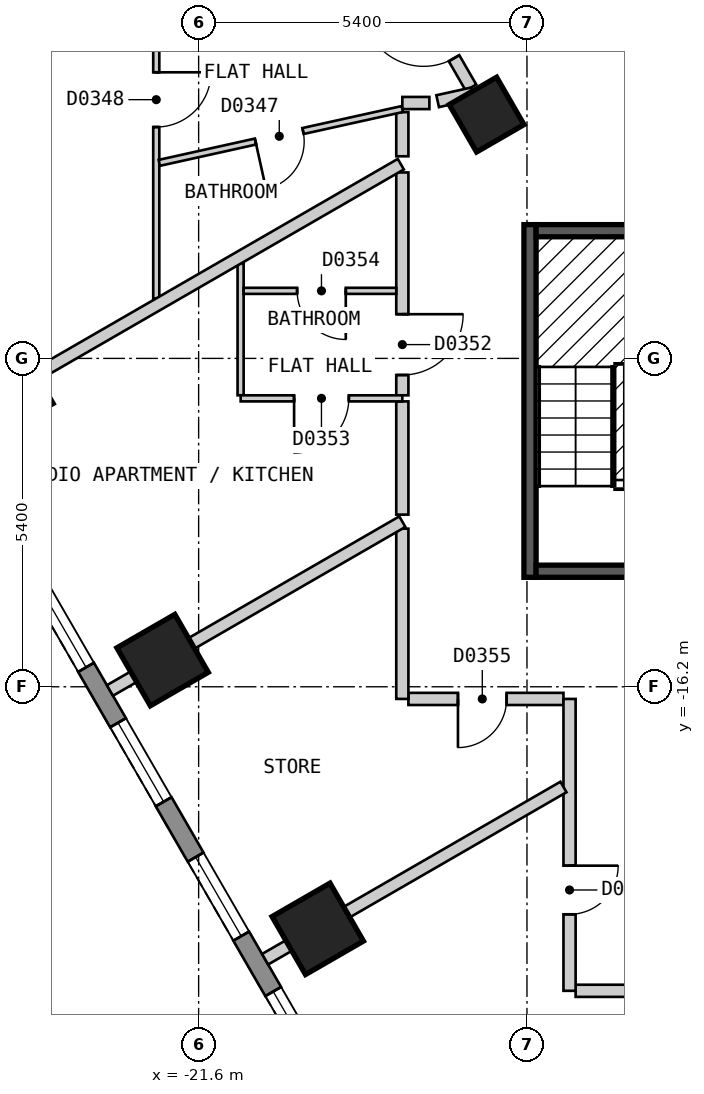
"""IFC4 building model, lengths in metres.
Left out: names, types, materials, properties, quantities, classifications, styles, units other than length and angle.
Written with IfcOpenShell. Run it as: python <this file> out.ifc"""

import sys

from ifc_helpers import new_model, si_unit, direction, frame, frame_2d, origin, origin_2d, place, context, subcontext, project, spatial, polyline, rectangle, outline, extrude, element, fill, save


model = new_model("IFC4")
c1 = context("Model", 3, precision=1e-05, world=origin(), true_north=direction((0.0, 1.0)))
c2 = subcontext(c1, "Body", "Model", "MODEL_VIEW")
j1 = project(units=[si_unit("LENGTHUNIT", "METRE"), si_unit("PLANEANGLEUNIT", "RADIAN")], contexts=[c1])
p1 = place(None, origin())
s1 = spatial("IfcSite", under=j1, at=p1, CompositionType="ELEMENT")
p2 = place(p1, origin())
s2 = spatial("IfcBuilding", under=s1, at=p2, CompositionType="ELEMENT")
p3 = place(p2, frame((0.0, 0.0, 59.4)))
s3 = spatial("IfcBuildingStorey", under=s2, at=p3, CompositionType="ELEMENT", Elevation=59.4)
for number, where, z_axis, x_axis in (
    (1, (-24.745, -11.341, 0.0), (0.0, 0.0, 1.0), (0.5, -0.866, 0.0)),
    (2, (-22.193, -15.761, 0.0), (0.0, 0.0, 1.0), (0.5, -0.866, 0.0)),
    (3, (-19.641, -20.181, 0.0), (0.0, 0.0, 1.0), (0.5, -0.866, 0.0)),
):
    element("IfcColumn", number, at=place(p3, frame(where, z_axis=z_axis, x_axis=x_axis)), inside=s3, PredefinedType="COLUMN", context=c2, shape_type="SweptSolid", body=[
        extrude(rectangle(XDim=1.1, YDim=1.1, at=origin_2d()), origin(), (0.0, 0.0, 1.0), 3.0),
    ])
p4 = place(p3, frame((-16.864, -6.791, 0.0), z_axis=(0.0, 0.0, 1.0), x_axis=(0.499984884929, -0.866034130299, 0.0)))
e4 = element("IfcColumn", 4, at=p4, inside=s3, PredefinedType="COLUMN", context=c2, shape_type="SweptSolid", body=[
    extrude(rectangle(XDim=0.9, YDim=0.9, at=origin_2d()), origin(), (0.0, 0.0, 1.0), 3.0),
])
p5 = place(p3, frame((-31.22, -2.425, 0.0), z_axis=(0.0, 0.0, 1.0), x_axis=(0.500001938803, -0.866024284413, 0.0)))
e5 = element("IfcWall", 5, at=p5, inside=s3, PredefinedType="SOLIDWALL", context=c2, shape_type="SweptSolid", body=[
    extrude(outline(polyline([(0.0, -0.15), (27.02, -0.15), (26.94, 0.15), (0.08, 0.15), (0.0, -0.15)])), origin(), (0.0, 0.0, 1.0), 2.6),
])
p6 = place(p5, frame((1.277, 0.0, 0.15)))
e6 = element("IfcOpeningElement", 6, at=p6, cuts=e5, PredefinedType="OPENING", context=c2, shape_type="SweptSolid", body=[
    extrude(rectangle(XDim=1.5, YDim=2.1, at=frame_2d((0.75, 1.05))), frame((0.0, 0.16, 0.0), z_axis=(0.0, -1.0, 0.0), x_axis=(1.0, 0.0, 0.0)), (0.0, 0.0, 1.0), 0.32),
])
p7 = place(p5, frame((3.829, 0.0, 0.15)))
e7 = element("IfcOpeningElement", 7, at=p7, cuts=e5, PredefinedType="OPENING", context=c2, shape_type="SweptSolid", body=[
    extrude(rectangle(XDim=1.5, YDim=2.1, at=frame_2d((0.75, 1.05))), frame((0.0, 0.16, 0.0), z_axis=(0.0, -1.0, 0.0), x_axis=(1.0, 0.0, 0.0)), (0.0, 0.0, 1.0), 0.32),
])
p8 = place(p5, frame((6.382, 0.0, 0.15)))
e8 = element("IfcOpeningElement", 8, at=p8, cuts=e5, PredefinedType="OPENING", context=c2, shape_type="SweptSolid", body=[
    extrude(rectangle(XDim=1.5, YDim=2.1, at=frame_2d((0.75, 1.05))), frame((0.0, 0.16, 0.0), z_axis=(0.0, -1.0, 0.0), x_axis=(1.0, 0.0, 0.0)), (0.0, 0.0, 1.0), 0.32),
])
p9 = place(p5, frame((8.933, 0.0, 0.15)))
e9 = element("IfcOpeningElement", 9, at=p9, cuts=e5, PredefinedType="OPENING", context=c2, shape_type="SweptSolid", body=[
    extrude(rectangle(XDim=1.5, YDim=2.1, at=frame_2d((0.75, 1.05))), frame((0.0, 0.16, 0.0), z_axis=(0.0, -1.0, 0.0), x_axis=(1.0, 0.0, 0.0)), (0.0, 0.0, 1.0), 0.32),
])
p10 = place(p5, frame((11.485, 0.0, 0.15)))
e10 = element("IfcOpeningElement", 10, at=p10, cuts=e5, PredefinedType="OPENING", context=c2, shape_type="SweptSolid", body=[
    extrude(rectangle(XDim=1.5, YDim=2.1, at=frame_2d((0.75, 1.05))), frame((0.0, 0.16, 0.0), z_axis=(0.0, -1.0, 0.0), x_axis=(1.0, 0.0, 0.0)), (0.0, 0.0, 1.0), 0.32),
])
p11 = place(p5, frame((14.037, 0.0, 0.15)))
e11 = element("IfcOpeningElement", 11, at=p11, cuts=e5, PredefinedType="OPENING", context=c2, shape_type="SweptSolid", body=[
    extrude(rectangle(XDim=1.5, YDim=2.1, at=frame_2d((0.75, 1.05))), frame((0.0, 0.16, 0.0), z_axis=(0.0, -1.0, 0.0), x_axis=(1.0, 0.0, 0.0)), (0.0, 0.0, 1.0), 0.32),
])
p12 = place(p5, frame((16.589, 0.0, 0.15)))
e12 = element("IfcOpeningElement", 12, at=p12, cuts=e5, PredefinedType="OPENING", context=c2, shape_type="SweptSolid", body=[
    extrude(rectangle(XDim=1.5, YDim=2.1, at=frame_2d((0.75, 1.05))), frame((0.0, 0.16, 0.0), z_axis=(0.0, -1.0, 0.0), x_axis=(1.0, 0.0, 0.0)), (0.0, 0.0, 1.0), 0.32),
])
p13 = place(p5, frame((19.141, 0.0, 0.15)))
e13 = element("IfcOpeningElement", 13, at=p13, cuts=e5, PredefinedType="OPENING", context=c2, shape_type="SweptSolid", body=[
    extrude(rectangle(XDim=1.5, YDim=2.1, at=frame_2d((0.75, 1.05))), frame((0.0, 0.16, 0.0), z_axis=(0.0, -1.0, 0.0), x_axis=(1.0, 0.0, 0.0)), (0.0, 0.0, 1.0), 0.32),
])
p14 = place(p5, frame((21.693, 0.0, 0.15)))
e14 = element("IfcOpeningElement", 14, at=p14, cuts=e5, PredefinedType="OPENING", context=c2, shape_type="SweptSolid", body=[
    extrude(rectangle(XDim=1.5, YDim=2.1, at=frame_2d((0.75, 1.05))), frame((0.0, 0.16, 0.0), z_axis=(0.0, -1.0, 0.0), x_axis=(1.0, 0.0, 0.0)), (0.0, 0.0, 1.0), 0.32),
])
p15 = place(p5, frame((24.244, 0.0, 0.15)))
e15 = element("IfcOpeningElement", 15, at=p15, cuts=e5, PredefinedType="OPENING", context=c2, shape_type="SweptSolid", body=[
    extrude(rectangle(XDim=1.5, YDim=2.1, at=frame_2d((0.75, 1.05))), frame((0.0, 0.16, 0.0), z_axis=(0.0, -1.0, 0.0), x_axis=(1.0, 0.0, 0.0)), (0.0, 0.0, 1.0), 0.32),
])
p16 = place(p3, frame((-20.727, -0.101, 0.0), z_axis=(0.0, 0.0, 1.0), x_axis=(0.500049702773, -0.865996705973, 0.0)))
e16 = element("IfcWall", 16, at=p16, inside=s3, PredefinedType="PARTITIONING", context=c2, shape_type="SweptSolid", body=[
    extrude(rectangle(XDim=7.211, YDim=0.2, at=frame_2d((3.605, 0.0))), origin(), (0.0, 0.0, 1.0), 2.6),
])
p17 = place(p16, frame((5.654, 0.0, 0.0)))
e17 = element("IfcOpeningElement", 17, at=p17, cuts=e16, PredefinedType="OPENING", context=c2, shape_type="SweptSolid", body=[
    extrude(rectangle(XDim=1.0, YDim=2.1, at=frame_2d((0.5, 1.05))), frame((0.0, 0.11, 0.0), z_axis=(0.0, -1.0, 0.0), x_axis=(1.0, 0.0, 0.0)), (0.0, 0.0, 1.0), 0.22),
])
p18 = place(p3, frame((-18.25, -11.507, 0.0), z_axis=(0.0, 0.0, 1.0), x_axis=(0.0, -1.0, 0.0)))
e18 = element("IfcWall", 18, at=p18, inside=s3, PredefinedType="PARTITIONING", context=c2, shape_type="SweptSolid", body=[
    extrude(rectangle(XDim=1.862, YDim=0.2, at=frame_2d((0.931, 0.0))), origin(), (0.0, 0.0, 1.0), 2.6),
])
p19 = place(p3, frame((-18.25, -6.6, 0.0), z_axis=(0.0, 0.0, 1.0), x_axis=(1.0, 0.0, 0.0)))
e19 = element("IfcWall", 19, at=p19, inside=s3, PredefinedType="PARTITIONING", context=c2, shape_type="SweptSolid", body=[
    extrude(rectangle(XDim=0.445, YDim=0.2, at=frame_2d((0.223, 0.0))), origin(), (0.0, 0.0, 1.0), 2.6),
])
p20 = place(p3, frame((-18.15, -16.4, 0.0), z_axis=(0.0, 0.0, 1.0), x_axis=(1.0, 0.0, 0.0)))
e20 = element("IfcWall", 20, at=p20, inside=s3, PredefinedType="PARTITIONING", context=c2, shape_type="SweptSolid", body=[
    extrude(rectangle(XDim=2.55, YDim=0.2, at=frame_2d((1.275, 0.0))), origin(), (0.0, 0.0, 1.0), 2.6),
])
p21 = place(p20, frame((0.815, 0.0, 0.0)))
e21 = element("IfcOpeningElement", 21, at=p21, cuts=e20, PredefinedType="OPENING", context=c2, shape_type="SweptSolid", body=[
    extrude(rectangle(XDim=0.8, YDim=2.1, at=frame_2d((0.4, 1.05))), frame((0.0, 0.11, 0.0), z_axis=(0.0, -1.0, 0.0), x_axis=(1.0, 0.0, 0.0)), (0.0, 0.0, 1.0), 0.22),
])
p22 = place(p3, frame((-15.4, -21.2, 0.0), z_axis=(0.0, 0.0, 1.0), x_axis=(1.0, 0.0, 0.0)))
e22 = element("IfcWall", 22, at=p22, inside=s3, PredefinedType="PARTITIONING", context=c2, shape_type="SweptSolid", body=[
    extrude(rectangle(XDim=30.799, YDim=0.2, at=frame_2d((15.399, 0.0))), origin(), (0.0, 0.0, 1.0), 2.6),
])
p23 = place(p22, frame((9.797, 0.0, 0.0)))
e23 = element("IfcOpeningElement", 23, at=p23, cuts=e22, PredefinedType="OPENING", context=c2, shape_type="SweptSolid", body=[
    extrude(rectangle(XDim=1.0, YDim=2.1, at=frame_2d((0.5, 1.05))), frame((0.0, 0.11, 0.0), z_axis=(0.0, -1.0, 0.0), x_axis=(1.0, 0.0, 0.0)), (0.0, 0.0, 1.0), 0.22),
])
p24 = place(p22, frame((14.901, 0.0, 0.0)))
e24 = element("IfcOpeningElement", 24, at=p24, cuts=e22, PredefinedType="OPENING", context=c2, shape_type="SweptSolid", body=[
    extrude(rectangle(XDim=1.0, YDim=2.1, at=frame_2d((0.5, 1.05))), frame((0.0, 0.11, 0.0), z_axis=(0.0, -1.0, 0.0), x_axis=(1.0, 0.0, 0.0)), (0.0, 0.0, 1.0), 0.22),
])
p25 = place(p22, frame((24.916, 0.0, 0.0)))
e25 = element("IfcOpeningElement", 25, at=p25, cuts=e22, PredefinedType="OPENING", context=c2, shape_type="SweptSolid", body=[
    extrude(rectangle(XDim=0.9, YDim=2.1, at=frame_2d((0.45, 1.05))), frame((0.0, 0.11, 0.0), z_axis=(0.0, -1.0, 0.0), x_axis=(1.0, 0.0, 0.0)), (0.0, 0.0, 1.0), 0.22),
])
p26 = place(p3, frame((-15.5, -21.2, 0.0), z_axis=(0.0, 0.0, 1.0), x_axis=(0.0, 1.0, 0.0)))
e26 = element("IfcWall", 26, at=p26, inside=s3, PredefinedType="PARTITIONING", context=c2, shape_type="SweptSolid", body=[
    extrude(rectangle(XDim=4.8, YDim=0.2, at=frame_2d((2.4, 0.0))), origin(), (0.0, 0.0, 1.0), 2.6),
])
p27 = place(p26, frame((1.258, 0.0, 0.0)))
e27 = element("IfcOpeningElement", 27, at=p27, cuts=e26, PredefinedType="OPENING", context=c2, shape_type="SweptSolid", body=[
    extrude(rectangle(XDim=0.8, YDim=2.1, at=frame_2d((0.4, 1.05))), frame((0.0, 0.11, 0.0), z_axis=(0.0, -1.0, 0.0), x_axis=(1.0, 0.0, 0.0)), (0.0, 0.0, 1.0), 0.22),
])
p28 = place(p3, frame((-18.25, -16.4, 0.0), z_axis=(0.0, 0.0, 1.0), x_axis=(0.0, 1.0, 0.0)))
e28 = element("IfcWall", 28, at=p28, inside=s3, PredefinedType="PARTITIONING", context=c2, shape_type="SweptSolid", body=[
    extrude(rectangle(XDim=2.8, YDim=0.2, at=frame_2d((1.4, 0.0))), origin(), (0.0, 0.0, 1.0), 2.6),
])
p29 = place(p3, frame((-18.25, -11.407, 0.0), z_axis=(0.0, 0.0, 1.0), x_axis=(0.0, 1.0, 0.0)))
e29 = element("IfcWall", 29, at=p29, inside=s3, PredefinedType="PARTITIONING", context=c2, shape_type="SweptSolid", body=[
    extrude(rectangle(XDim=3.665, YDim=0.2, at=frame_2d((1.833, 0.0))), origin(), (0.0, 0.0, 1.0), 2.6),
])
p30 = place(p29, frame((0.334, 0.0, 0.0)))
e30 = element("IfcOpeningElement", 30, at=p30, cuts=e29, PredefinedType="OPENING", context=c2, shape_type="SweptSolid", body=[
    extrude(rectangle(XDim=1.0, YDim=2.1, at=frame_2d((0.5, 1.05))), frame((0.0, 0.11, 0.0), z_axis=(0.0, -1.0, 0.0), x_axis=(1.0, 0.0, 0.0)), (0.0, 0.0, 1.0), 0.22),
])
p31 = place(p3, frame((-18.25, -7.476, 0.0), z_axis=(0.0, 0.0, 1.0), x_axis=(0.0, 1.0, 0.0)))
e31 = element("IfcWall", 31, at=p31, inside=s3, PredefinedType="PARTITIONING", context=c2, shape_type="SweptSolid", body=[
    extrude(rectangle(XDim=0.726, YDim=0.2, at=frame_2d((0.363, 0.0))), origin(), (0.0, 0.0, 1.0), 2.6),
])
p32 = place(p3, frame((-20.91, -9.243, 0.0), z_axis=(0.0, 0.0, 1.0), x_axis=(0.0, -1.0, 0.0)))
e32 = element("IfcWall", 32, at=p32, inside=s3, PredefinedType="PARTITIONING", context=c2, shape_type="SweptSolid", body=[
    extrude(rectangle(XDim=2.163, YDim=0.1, at=frame_2d((1.082, 0.0))), origin(), (0.0, 0.0, 1.0), 2.6),
])
p33 = place(p3, frame((-20.86, -9.689, 0.0), z_axis=(0.0, 0.0, 1.0), x_axis=(1.0, 0.0, 0.0)))
e33 = element("IfcWall", 33, at=p33, inside=s3, PredefinedType="PARTITIONING", context=c2, shape_type="SweptSolid", body=[
    extrude(rectangle(XDim=2.51, YDim=0.1, at=frame_2d((1.255, 0.0))), origin(), (0.0, 0.0, 1.0), 2.6),
])
p34 = place(p33, frame((0.88, 0.0, 0.0)))
e34 = element("IfcOpeningElement", 34, at=p34, cuts=e33, PredefinedType="OPENING", context=c2, shape_type="SweptSolid", body=[
    extrude(rectangle(XDim=0.8, YDim=2.1, at=frame_2d((0.4, 1.05))), frame((0.0, 0.06, 0.0), z_axis=(0.0, -1.0, 0.0), x_axis=(1.0, 0.0, 0.0)), (0.0, 0.0, 1.0), 0.12),
])
p35 = place(p3, frame((-20.909, -11.457, 0.0), z_axis=(0.0, 0.0, 1.0), x_axis=(1.0, 0.0, 0.0)))
e35 = element("IfcWall", 35, at=p35, inside=s3, PredefinedType="PARTITIONING", context=c2, shape_type="SweptSolid", body=[
    extrude(rectangle(XDim=2.659, YDim=0.1, at=frame_2d((1.33, 0.0))), origin(), (0.0, 0.0, 1.0), 2.6),
])
p36 = place(p35, frame((0.879, 0.0, 0.0)))
e36 = element("IfcOpeningElement", 36, at=p36, cuts=e35, PredefinedType="OPENING", context=c2, shape_type="SweptSolid", body=[
    extrude(rectangle(XDim=0.9, YDim=2.1, at=frame_2d((0.45, 1.05))), frame((0.0, 0.06, 0.0), z_axis=(0.0, -1.0, 0.0), x_axis=(1.0, 0.0, 0.0)), (0.0, 0.0, 1.0), 0.12),
])
p37 = place(p3, frame((-22.297, -9.813, 0.0), z_axis=(0.0, 0.0, 1.0), x_axis=(0.0, 1.0, 0.0)))
e37 = element("IfcWall", 37, at=p37, inside=s3, PredefinedType="PARTITIONING", context=c2, shape_type="SweptSolid", body=[
    extrude(rectangle(XDim=4.338, YDim=0.1, at=frame_2d((2.169, 0.0))), origin(), (0.0, 0.0, 1.0), 2.6),
])
p38 = place(p37, frame((2.818, 0.0, 0.0)))
e38 = element("IfcOpeningElement", 38, at=p38, cuts=e37, PredefinedType="OPENING", context=c2, shape_type="SweptSolid", body=[
    extrude(rectangle(XDim=0.9, YDim=2.1, at=frame_2d((0.45, 1.05))), frame((0.0, 0.06, 0.0), z_axis=(0.0, -1.0, 0.0), x_axis=(1.0, 0.0, 0.0)), (0.0, 0.0, 1.0), 0.12),
])
p39 = place(p3, frame((-22.247, -7.584, 0.0), z_axis=(0.0, 0.0, 1.0), x_axis=(0.97635375062, 0.216178985219, 0.0)))
e39 = element("IfcWall", 39, at=p39, inside=s3, PredefinedType="PARTITIONING", context=c2, shape_type="SweptSolid", body=[
    extrude(rectangle(XDim=4.094, YDim=0.1, at=frame_2d((2.047, 0.0))), origin(), (0.0, 0.0, 1.0), 2.6),
])
p40 = place(p39, frame((1.621, 0.0, 0.0)))
e40 = element("IfcOpeningElement", 40, at=p40, cuts=e39, PredefinedType="OPENING", context=c2, shape_type="SweptSolid", body=[
    extrude(rectangle(XDim=0.8, YDim=2.1, at=frame_2d((0.4, 1.05))), frame((0.0, 0.06, 0.0), z_axis=(0.0, -1.0, 0.0), x_axis=(1.0, 0.0, 0.0)), (0.0, 0.0, 1.0), 0.12),
])
p41 = place(p3, frame((-28.163, -7.42, 0.0), z_axis=(0.0, 0.0, 1.0), x_axis=(0.866065245018, 0.499930986609, 0.0)))
e41 = element("IfcWall", 41, at=p41, inside=s3, PredefinedType="PARTITIONING", context=c2, shape_type="SweptSolid", body=[
    extrude(rectangle(XDim=10.0, YDim=0.1, at=frame_2d((5.0, 0.0))), origin(), (0.0, 0.0, 1.0), 2.6),
])
p42 = place(p41, frame((2.576, 0.0, 0.0)))
e42 = element("IfcOpeningElement", 42, at=p42, cuts=e41, PredefinedType="OPENING", context=c2, shape_type="SweptSolid", body=[
    extrude(rectangle(XDim=0.9, YDim=2.1, at=frame_2d((0.45, 1.05))), frame((0.0, 0.06, 0.0), z_axis=(0.0, -1.0, 0.0), x_axis=(1.0, 0.0, 0.0)), (0.0, 0.0, 1.0), 0.12),
])
p43 = place(p3, frame((-17.669, -6.57, 0.0), z_axis=(0.0, 0.0, 1.0), x_axis=(0.976422724526, 0.215867234728, 0.0)))
e43 = element("IfcWall", 43, at=p43, inside=s3, PredefinedType="PARTITIONING", context=c2, shape_type="SweptSolid", body=[
    extrude(rectangle(XDim=0.583, YDim=0.2, at=frame_2d((0.292, 0.0))), origin(), (0.0, 0.0, 1.0), 2.6),
])
p44 = place(p3, frame((-20.507, -20.681, 0.0), z_axis=(0.0, 0.0, 1.0), x_axis=(0.866028446103, 0.499994730513, 0.0)))
e44 = element("IfcWall", 44, at=p44, inside=s3, PredefinedType="PARTITIONING", context=c2, shape_type="SweptSolid", body=[
    extrude(rectangle(XDim=5.666, YDim=0.2, at=frame_2d((2.833, 0.0))), origin(), (0.0, 0.0, 1.0), 2.6),
])
p45 = place(p3, frame((-23.059, -16.261, 0.0), z_axis=(0.0, 0.0, 1.0), x_axis=(0.866075767886, 0.499912756669, 0.0)))
e45 = element("IfcWall", 45, at=p45, inside=s3, PredefinedType="PARTITIONING", context=c2, shape_type="SweptSolid", body=[
    extrude(rectangle(XDim=5.553, YDim=0.2, at=frame_2d((2.776, 0.0))), origin(), (0.0, 0.0, 1.0), 2.6),
])
p46 = place(p3, frame((-25.61, -11.841, 0.0), z_axis=(0.0, 0.0, 1.0), x_axis=(0.866019023803, 0.500011050288, 0.0)))
e46 = element("IfcWall", 46, at=p46, inside=s3, PredefinedType="PARTITIONING", context=c2, shape_type="SweptSolid", body=[
    extrude(rectangle(XDim=8.47, YDim=0.2, at=frame_2d((4.235, 0.0))), origin(), (0.0, 0.0, 1.0), 2.6),
])
p47 = place(p3, frame((-16.15, -14.4, 0.0), z_axis=(0.0, 0.0, 1.0), x_axis=(0.0, 1.0, 0.0)))
e47 = element("IfcWall", 47, at=p47, inside=s3, PredefinedType="SOLIDWALL", context=c2, shape_type="SweptSolid", body=[
    extrude(rectangle(XDim=5.8, YDim=0.2, at=frame_2d((2.9, 0.0))), origin(), (0.0, 0.0, 1.0), 2.6),
])
for number, where, z_axis, x_axis in (
    (48, (-16.05, -14.3, 0.0), (0.0, 0.0, 1.0), (1.0, 0.0, 0.0)),
    (49, (-16.05, -8.7, 0.0), (0.0, 0.0, 1.0), (1.0, 0.0, 0.0)),
):
    element("IfcWall", number, at=place(p3, frame(where, z_axis=z_axis, x_axis=x_axis)), inside=s3, PredefinedType="SOLIDWALL", context=c2, shape_type="SweptSolid", body=[
        extrude(rectangle(XDim=2.75, YDim=0.2, at=frame_2d((1.375, 0.0))), origin(), (0.0, 0.0, 1.0), 2.6),
    ])
p48 = place(p11, origin())
e50 = element("IfcWindow", 50, at=p48, inside=s3, PartitioningType="SINGLE_PANEL", PredefinedType="WINDOW", context=c2, shape_type="SweptSolid", body=[
    extrude(rectangle(XDim=1.5, YDim=2.1, at=frame_2d((0.75, 1.05))), frame((0.0, 0.03, 0.0), z_axis=(0.0, -1.0, 0.0), x_axis=(1.0, 0.0, 0.0)), (0.0, 0.0, 1.0), 0.06),
])
fill(e11, e50)
p49 = place(p12, origin())
e51 = element("IfcWindow", 51, at=p49, inside=s3, PartitioningType="SINGLE_PANEL", PredefinedType="WINDOW", context=c2, shape_type="SweptSolid", body=[
    extrude(rectangle(XDim=1.5, YDim=2.1, at=frame_2d((0.75, 1.05))), frame((0.0, 0.03, 0.0), z_axis=(0.0, -1.0, 0.0), x_axis=(1.0, 0.0, 0.0)), (0.0, 0.0, 1.0), 0.06),
])
fill(e12, e51)
p50 = place(p13, origin())
e52 = element("IfcWindow", 52, at=p50, inside=s3, PartitioningType="SINGLE_PANEL", PredefinedType="WINDOW", context=c2, shape_type="SweptSolid", body=[
    extrude(rectangle(XDim=1.5, YDim=2.1, at=frame_2d((0.75, 1.05))), frame((0.0, 0.03, 0.0), z_axis=(0.0, -1.0, 0.0), x_axis=(1.0, 0.0, 0.0)), (0.0, 0.0, 1.0), 0.06),
])
fill(e13, e52)
p51 = place(p14, origin())
e53 = element("IfcWindow", 53, at=p51, inside=s3, PartitioningType="SINGLE_PANEL", PredefinedType="WINDOW", context=c2, shape_type="SweptSolid", body=[
    extrude(rectangle(XDim=1.5, YDim=2.1, at=frame_2d((0.75, 1.05))), frame((0.0, 0.03, 0.0), z_axis=(0.0, -1.0, 0.0), x_axis=(1.0, 0.0, 0.0)), (0.0, 0.0, 1.0), 0.06),
])
fill(e14, e53)
p52 = place(p17, origin())
e54 = element("IfcDoor", 54, at=p52, inside=s3, OperationType="SINGLE_SWING_LEFT", PredefinedType="DOOR", context=c2, shape_type="SweptSolid", body=[
    extrude(rectangle(XDim=1.0, YDim=2.1, at=frame_2d((0.5, 1.05))), frame((0.0, 0.025, 0.0), z_axis=(0.0, -1.0, 0.0), x_axis=(1.0, 0.0, 0.0)), (0.0, 0.0, 1.0), 0.05),
])
fill(e17, e54)
p53 = place(p40, origin())
e55 = element("IfcDoor", 55, at=p53, inside=s3, OperationType="SINGLE_SWING_LEFT", PredefinedType="DOOR", context=c2, shape_type="SweptSolid", body=[
    extrude(rectangle(XDim=0.8, YDim=2.1, at=frame_2d((0.4, 1.05))), frame((0.0, 0.025, 0.0), z_axis=(0.0, -1.0, 0.0), x_axis=(1.0, 0.0, 0.0)), (0.0, 0.0, 1.0), 0.05),
])
fill(e40, e55)
p54 = place(p38, origin())
e56 = element("IfcDoor", 56, at=p54, inside=s3, OperationType="SINGLE_SWING_RIGHT", PredefinedType="DOOR", context=c2, shape_type="SweptSolid", body=[
    extrude(rectangle(XDim=0.9, YDim=2.1, at=frame_2d((0.45, 1.05))), frame((0.0, 0.025, 0.0), z_axis=(0.0, -1.0, 0.0), x_axis=(1.0, 0.0, 0.0)), (0.0, 0.0, 1.0), 0.05),
])
fill(e38, e56)
p55 = place(p30, origin())
e57 = element("IfcDoor", 57, at=p55, inside=s3, OperationType="SINGLE_SWING_RIGHT", PredefinedType="DOOR", context=c2, shape_type="SweptSolid", body=[
    extrude(rectangle(XDim=1.0, YDim=2.1, at=frame_2d((0.5, 1.05))), frame((0.0, 0.025, 0.0), z_axis=(0.0, -1.0, 0.0), x_axis=(1.0, 0.0, 0.0)), (0.0, 0.0, 1.0), 0.05),
])
fill(e30, e57)
p56 = place(p36, origin())
e58 = element("IfcDoor", 58, at=p56, inside=s3, OperationType="SINGLE_SWING_LEFT", PredefinedType="DOOR", context=c2, shape_type="SweptSolid", body=[
    extrude(rectangle(XDim=0.9, YDim=2.1, at=frame_2d((0.45, 1.05))), frame((0.0, 0.025, 0.0), z_axis=(0.0, -1.0, 0.0), x_axis=(1.0, 0.0, 0.0)), (0.0, 0.0, 1.0), 0.05),
])
fill(e36, e58)
p57 = place(p34, origin())
e59 = element("IfcDoor", 59, at=p57, inside=s3, OperationType="SINGLE_SWING_RIGHT", PredefinedType="DOOR", context=c2, shape_type="SweptSolid", body=[
    extrude(rectangle(XDim=0.8, YDim=2.1, at=frame_2d((0.4, 1.05))), frame((0.0, 0.025, 0.0), z_axis=(0.0, -1.0, 0.0), x_axis=(1.0, 0.0, 0.0)), (0.0, 0.0, 1.0), 0.05),
])
fill(e34, e59)
p58 = place(p21, origin())
e60 = element("IfcDoor", 60, at=p58, inside=s3, OperationType="SINGLE_SWING_LEFT", PredefinedType="DOOR", context=c2, shape_type="SweptSolid", body=[
    extrude(rectangle(XDim=0.8, YDim=2.1, at=frame_2d((0.4, 1.05))), frame((0.0, 0.025, 0.0), z_axis=(0.0, -1.0, 0.0), x_axis=(1.0, 0.0, 0.0)), (0.0, 0.0, 1.0), 0.05),
])
fill(e21, e60)
p59 = place(p27, origin())
e61 = element("IfcDoor", 61, at=p59, inside=s3, OperationType="SINGLE_SWING_RIGHT", PredefinedType="DOOR", context=c2, shape_type="SweptSolid", body=[
    extrude(rectangle(XDim=0.8, YDim=2.1, at=frame_2d((0.4, 1.05))), frame((0.0, 0.025, 0.0), z_axis=(0.0, -1.0, 0.0), x_axis=(1.0, 0.0, 0.0)), (0.0, 0.0, 1.0), 0.05),
])
fill(e27, e61)
save(model, sys.argv[1])
